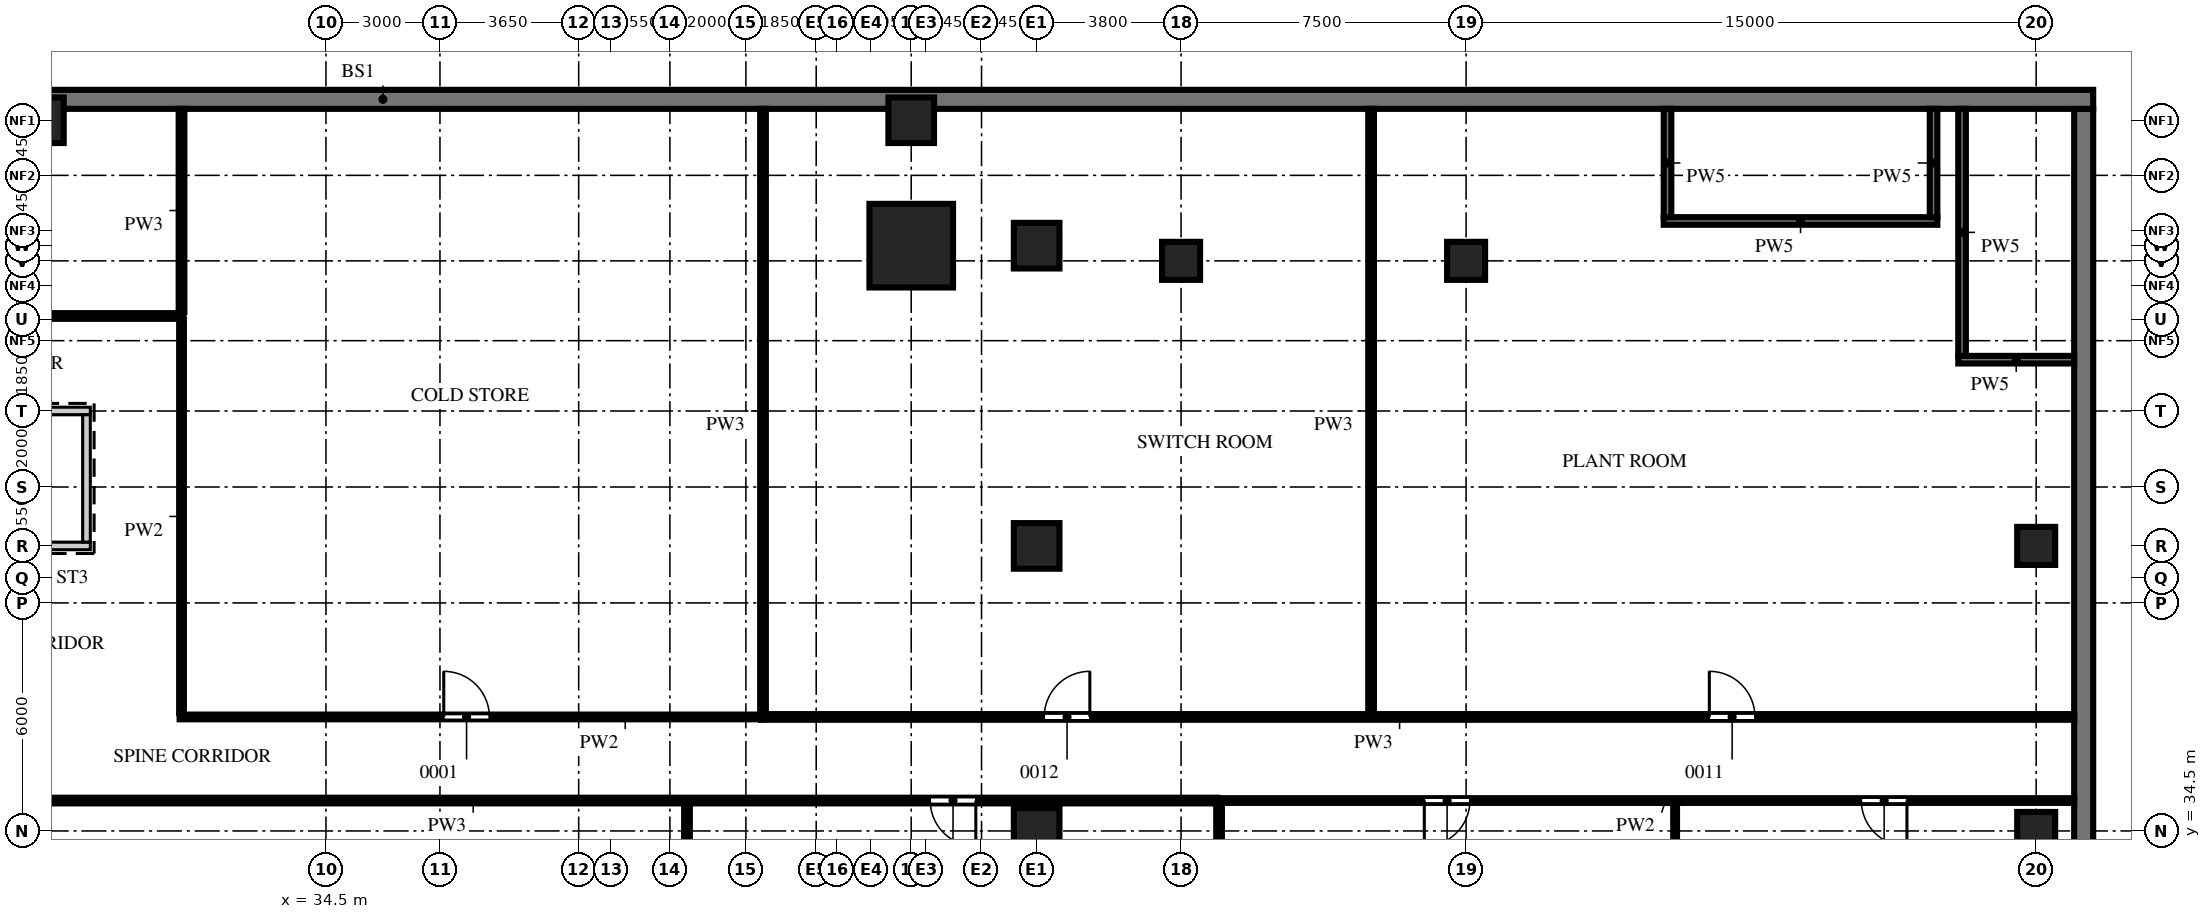
"""IFC4 building model, lengths in metres.
Left out: names, types, materials, properties, quantities, classifications, styles, units other than length and angle.
Written with IfcOpenShell. Run it as: python <this file> out.ifc"""

import sys

from ifc_helpers import new_model, si_unit, direction, frame, frame_2d, origin, origin_2d, place, context, subcontext, project, spatial, rectangle, extrude, source, transform, mapped, element, fill, save


model = new_model("IFC4")
c1 = context("Model", 3, precision=1e-05, world=origin(), true_north=direction((0.0, 1.0)))
c2 = subcontext(c1, "Body", "Model", "MODEL_VIEW")
j1 = project(units=[si_unit("LENGTHUNIT", "METRE"), si_unit("PLANEANGLEUNIT", "RADIAN")], contexts=[c1])
p1 = place(None, origin())
s1 = spatial("IfcSite", under=j1, at=p1, CompositionType="ELEMENT")
p2 = place(p1, origin())
s2 = spatial("IfcBuilding", under=s1, at=p2, CompositionType="ELEMENT")
p3 = place(p2, frame((0.0, 0.0, -9.0)))
s3 = spatial("IfcBuildingStorey", under=s2, at=p3, CompositionType="ELEMENT", Elevation=-9.0)
m1 = source(origin(), c2, "Body", "SweptSolid", [
    extrude(rectangle(XDim=7.1, YDim=0.2, at=frame_2d((3.55, 0.0))), origin(), (0.0, 0.0, 1.0), 4.2),
])
p4 = place(p3, frame((21.2, 45.55, 0.0), z_axis=(0.0, 0.0, 1.0), x_axis=(1.0, 0.0, 0.0)))
e1 = element("IfcWall", 1, at=p4, inside=s3, PredefinedType="SHEAR", context=c2, shape_type="MappedRepresentation", body=[
    mapped(m1, transform((0.0, 0.0, 0.0))),
])
m2 = source(origin(), c2, "Body", "SweptSolid", [
    extrude(rectangle(XDim=1.2, YDim=2.1, at=frame_2d((0.6, 1.05))), frame((0.0, 0.11, 0.0), z_axis=(0.0, -1.0, 0.0), x_axis=(1.0, 0.0, 0.0)), (0.0, 0.0, 1.0), 0.22),
])
p5 = place(p4, frame((0.15, 0.0, 0.0)))
e2 = element("IfcOpeningElement", 2, at=p5, cuts=e1, PredefinedType="OPENING", context=c2, shape_type="MappedRepresentation", body=[
    mapped(m2, transform((0.0, 0.0, 0.0))),
])
p6 = place(p3, frame((21.2, 42.0, 0.0), z_axis=(0.0, 0.0, 1.0), x_axis=(1.0, 0.0, 0.0)))
e3 = element("IfcWall", 3, at=p6, inside=s3, PredefinedType="SHEAR", context=c2, shape_type="MappedRepresentation", body=[
    mapped(m1, transform((0.0, 0.0, 0.0))),
])
m3 = source(origin(), c2, "Body", "SweptSolid", [
    extrude(rectangle(XDim=3.35, YDim=0.2, at=frame_2d((1.675, 0.0))), origin(), (0.0, 0.0, 1.0), 4.2),
])
p7 = place(p3, frame((28.2, 42.1, 0.0), z_axis=(0.0, 0.0, 1.0), x_axis=(0.0, 1.0, 0.0)))
e4 = element("IfcWall", 4, at=p7, inside=s3, PredefinedType="SHEAR", context=c2, shape_type="MappedRepresentation", body=[
    mapped(m3, transform((0.0, 0.0, 0.0))),
])
m4 = source(origin(), c2, "Body", "SweptSolid", [
    extrude(rectangle(XDim=53.0, YDim=0.5, at=frame_2d((26.5, 0.0))), origin(), (0.0, 0.0, 1.0), 4.2),
])
p8 = place(p3, frame((80.75, 0.5, 0.0), z_axis=(0.0, 0.0, 1.0), x_axis=(0.0, 1.0, 0.0)))
e5 = element("IfcWall", 5, at=p8, inside=s3, PredefinedType="STANDARD", context=c2, shape_type="MappedRepresentation", body=[
    mapped(m4, transform((0.0, 0.0, 0.0))),
])
m5 = source(origin(), c2, "Body", "SweptSolid", [
    extrude(rectangle(XDim=90.0, YDim=0.5, at=frame_2d((45.0, 0.0))), origin(), (0.0, 0.0, 1.0), 4.2),
])
p9 = place(p3, frame((-9.0, 53.75, 0.0), z_axis=(0.0, 0.0, 1.0), x_axis=(1.0, 0.0, 0.0)))
e6 = element("IfcWall", 6, at=p9, inside=s3, PredefinedType="STANDARD", context=c2, shape_type="MappedRepresentation", body=[
    mapped(m5, transform((0.0, 0.0, 0.0))),
])
m6 = source(origin(), c2, "Body", "SweptSolid", [
    extrude(rectangle(XDim=2.2, YDim=2.2, at=origin_2d()), origin(), (0.0, 0.0, 1.0), 4.5),
])
p10 = place(p3, frame((49.9, 49.9, 0.0), z_axis=(0.0, 0.0, 1.0), x_axis=(1.0, 0.0, 0.0)))
e7 = element("IfcColumn", 7, at=p10, inside=s3, PredefinedType="COLUMN", context=c2, shape_type="MappedRepresentation", body=[
    mapped(m6, transform((0.0, 0.0, 0.0))),
])
m7 = source(origin(), c2, "Body", "SweptSolid", [
    extrude(rectangle(XDim=1.2, YDim=1.2, at=origin_2d()), origin(), (0.0, 0.0, 1.0), 4.2),
])
for number, where, z_axis, x_axis in (
    (8, (53.2, 34.5, 0.0), (0.0, 0.0, 1.0), (1.0, 0.0, 0.0)),
    (9, (53.2, 42.0, 0.0), (0.0, 0.0, 1.0), (1.0, 0.0, 0.0)),
    (10, (53.2, 49.9, 0.0), (0.0, 0.0, 1.0), (1.0, 0.0, 0.0)),
    (11, (27.0, 53.2, 0.0), (0.0, 0.0, 1.0), (1.0, 0.0, 0.0)),
    (12, (49.9, 53.2, 0.0), (0.0, 0.0, 1.0), (1.0, 0.0, 0.0)),
):
    element("IfcColumn", number, at=place(p3, frame(where, z_axis=z_axis, x_axis=x_axis)), inside=s3, PredefinedType="COLUMN", context=c2, shape_type="MappedRepresentation", body=[
        mapped(m7, transform((0.0, 0.0, 0.0))),
    ])
m8 = source(origin(), c2, "Body", "SweptSolid", [
    extrude(rectangle(XDim=1.0, YDim=1.0, at=origin_2d()), origin(), (0.0, 0.0, 1.0), 4.2),
])
for number, where, z_axis, x_axis in (
    (13, (57.0, 49.5, 0.0), (0.0, 0.0, 1.0), (1.0, 0.0, 0.0)),
    (14, (64.5, 49.5, 0.0), (0.0, 0.0, 1.0), (1.0, 0.0, 0.0)),
    (15, (79.5, 34.5, 0.0), (0.0, 0.0, 1.0), (1.0, 0.0, 0.0)),
    (16, (79.5, 42.0, 0.0), (0.0, 0.0, 1.0), (1.0, 0.0, 0.0)),
):
    element("IfcColumn", number, at=place(p3, frame(where, z_axis=z_axis, x_axis=x_axis)), inside=s3, PredefinedType="COLUMN", context=c2, shape_type="MappedRepresentation", body=[
        mapped(m8, transform((0.0, 0.0, 0.0))),
    ])
m9 = source(origin(), c2, "Body", "SweptSolid", [
    extrude(rectangle(XDim=15.7, YDim=0.15, at=frame_2d((7.85, 0.0))), origin(), (0.0, 0.0, 1.0), 4.2),
])
for number, where, z_axis, x_axis in (
    (17, (44.0, 19.5, 0.0), (0.0, 0.0, 1.0), (0.0, 1.0, 0.0)),
    (18, (58.0, 19.5, 0.0), (0.0, 0.0, 1.0), (0.0, 1.0, 0.0)),
):
    element("IfcWall", number, at=place(p3, frame(where, z_axis=z_axis, x_axis=x_axis)), inside=s3, PredefinedType="PARTITIONING", context=c2, shape_type="MappedRepresentation", body=[
        mapped(m9, transform((0.0, 0.0, 0.0))),
    ])
m10 = source(origin(), c2, "Body", "SweptSolid", [
    extrude(rectangle(XDim=15.7, YDim=0.1, at=frame_2d((7.85, 0.0))), origin(), (0.0, 0.0, 1.0), 4.2),
])
p11 = place(p3, frame((70.0, 19.5, 0.0), z_axis=(0.0, 0.0, 1.0), x_axis=(0.0, 1.0, 0.0)))
e19 = element("IfcWall", 19, at=p11, inside=s3, PredefinedType="PARTITIONING", context=c2, shape_type="MappedRepresentation", body=[
    mapped(m10, transform((0.0, 0.0, 0.0))),
])
m11 = source(origin(), c2, "Body", "SweptSolid", [
    extrude(rectangle(XDim=31.6, YDim=0.15, at=frame_2d((15.8, 0.0))), origin(), (0.0, 0.0, 1.0), 4.2),
])
p12 = place(p3, frame((26.35, 35.3, 0.0), z_axis=(0.0, 0.0, 1.0), x_axis=(1.0, 0.0, 0.0)))
e20 = element("IfcWall", 20, at=p12, inside=s3, PredefinedType="PARTITIONING", context=c2, shape_type="MappedRepresentation", body=[
    mapped(m11, transform((0.0, 0.0, 0.0))),
])
m12 = source(origin(), c2, "Body", "SweptSolid", [
    extrude(rectangle(XDim=1.2, YDim=2.1, at=frame_2d((0.6, 1.05))), frame((0.0, 0.085, 0.0), z_axis=(0.0, -1.0, 0.0), x_axis=(1.0, 0.0, 0.0)), (0.0, 0.0, 1.0), 0.17),
])
p13 = place(p12, frame((24.05, 0.0, 0.0)))
e21 = element("IfcOpeningElement", 21, at=p13, cuts=e20, PredefinedType="OPENING", context=c2, shape_type="MappedRepresentation", body=[
    mapped(m12, transform((0.0, 0.0, 0.0))),
])
m13 = source(origin(), c2, "Body", "SweptSolid", [
    extrude(rectangle(XDim=22.55, YDim=0.125, at=frame_2d((11.275, 0.0))), origin(), (0.0, 0.0, 1.0), 4.2),
])
p14 = place(p3, frame((57.95, 35.3, 0.0), z_axis=(0.0, 0.0, 1.0), x_axis=(1.0, 0.0, 0.0)))
e22 = element("IfcWall", 22, at=p14, inside=s3, PredefinedType="PARTITIONING", context=c2, shape_type="MappedRepresentation", body=[
    mapped(m13, transform((0.0, 0.0, 0.0))),
])
m14 = source(origin(), c2, "Body", "SweptSolid", [
    extrude(rectangle(XDim=1.2, YDim=2.1, at=frame_2d((0.6, 1.05))), frame((0.0, 0.073, 0.0), z_axis=(0.0, -1.0, 0.0), x_axis=(1.0, 0.0, 0.0)), (0.0, 0.0, 1.0), 0.145),
])
p15 = place(p14, frame((5.45, 0.0, 0.0)))
e23 = element("IfcOpeningElement", 23, at=p15, cuts=e22, PredefinedType="OPENING", context=c2, shape_type="MappedRepresentation", body=[
    mapped(m14, transform((0.0, 0.0, 0.0))),
])
p16 = place(p14, frame((16.95, 0.0, 0.0)))
e24 = element("IfcOpeningElement", 24, at=p16, cuts=e22, PredefinedType="OPENING", context=c2, shape_type="MappedRepresentation", body=[
    mapped(m14, transform((0.0, 0.0, 0.0))),
])
m15 = source(origin(), c2, "Body", "SweptSolid", [
    extrude(rectangle(XDim=15.3, YDim=0.125, at=frame_2d((7.65, 0.0))), origin(), (0.0, 0.0, 1.0), 4.2),
])
p17 = place(p3, frame((30.65, 37.5, 0.0), z_axis=(0.0, 0.0, 1.0), x_axis=(1.0, 0.0, 0.0)))
e25 = element("IfcWall", 25, at=p17, inside=s3, PredefinedType="PARTITIONING", context=c2, shape_type="MappedRepresentation", body=[
    mapped(m15, transform((0.0, 0.0, 0.0))),
])
p18 = place(p17, frame((6.95, 0.0, 0.0)))
e26 = element("IfcOpeningElement", 26, at=p18, cuts=e25, PredefinedType="OPENING", context=c2, shape_type="MappedRepresentation", body=[
    mapped(m14, transform((0.0, 0.0, 0.0))),
])
m16 = source(origin(), c2, "Body", "SweptSolid", [
    extrude(rectangle(XDim=34.55, YDim=0.15, at=frame_2d((17.275, 0.0))), origin(), (0.0, 0.0, 1.0), 4.2),
])
p19 = place(p3, frame((45.95, 37.5, 0.0), z_axis=(0.0, 0.0, 1.0), x_axis=(1.0, 0.0, 0.0)))
e27 = element("IfcWall", 27, at=p19, inside=s3, PredefinedType="PARTITIONING", context=c2, shape_type="MappedRepresentation", body=[
    mapped(m16, transform((0.0, 0.0, 0.0))),
])
p20 = place(p19, frame((7.45, 0.0, 0.0)))
e28 = element("IfcOpeningElement", 28, at=p20, cuts=e27, PredefinedType="OPENING", context=c2, shape_type="MappedRepresentation", body=[
    mapped(m12, transform((0.0, 0.0, 0.0))),
])
p21 = place(p19, frame((24.95, 0.0, 0.0)))
e29 = element("IfcOpeningElement", 29, at=p21, cuts=e27, PredefinedType="OPENING", context=c2, shape_type="MappedRepresentation", body=[
    mapped(m12, transform((0.0, 0.0, 0.0))),
])
m17 = source(origin(), c2, "Body", "SweptSolid", [
    extrude(rectangle(XDim=10.35, YDim=0.125, at=frame_2d((5.175, 0.0))), origin(), (0.0, 0.0, 1.0), 4.2),
])
p22 = place(p3, frame((30.7, 37.6, 0.0), z_axis=(0.0, 0.0, 1.0), x_axis=(0.0, 1.0, 0.0)))
e30 = element("IfcWall", 30, at=p22, inside=s3, PredefinedType="PARTITIONING", context=c2, shape_type="MappedRepresentation", body=[
    mapped(m17, transform((0.0, 0.0, 0.0))),
])
m18 = source(origin(), c2, "Body", "SweptSolid", [
    extrude(rectangle(XDim=15.9, YDim=0.15, at=frame_2d((7.95, 0.0))), origin(), (0.0, 0.0, 1.0), 4.2),
])
for number, where, z_axis, x_axis in (
    (31, (46.0, 37.6, 0.0), (0.0, 0.0, 1.0), (0.0, 1.0, 0.0)),
    (32, (62.0, 37.6, 0.0), (0.0, 0.0, 1.0), (0.0, 1.0, 0.0)),
):
    element("IfcWall", number, at=place(p3, frame(where, z_axis=z_axis, x_axis=x_axis)), inside=s3, PredefinedType="PARTITIONING", context=c2, shape_type="MappedRepresentation", body=[
        mapped(m18, transform((0.0, 0.0, 0.0))),
    ])
m19 = source(origin(), c2, "Body", "SweptSolid", [
    extrude(rectangle(XDim=26.45, YDim=0.15, at=frame_2d((13.225, 0.0))), origin(), (0.0, 0.0, 1.0), 4.2),
])
p23 = place(p3, frame((4.3, 48.05, 0.0), z_axis=(0.0, 0.0, 1.0), x_axis=(1.0, 0.0, 0.0)))
e33 = element("IfcWall", 33, at=p23, inside=s3, PredefinedType="PARTITIONING", context=c2, shape_type="MappedRepresentation", body=[
    mapped(m19, transform((0.0, 0.0, 0.0))),
])
m20 = source(origin(), c2, "Body", "SweptSolid", [
    extrude(rectangle(XDim=0.9, YDim=2.1, at=frame_2d((0.45, 1.05))), frame((0.0, 0.085, 0.0), z_axis=(0.0, -1.0, 0.0), x_axis=(1.0, 0.0, 0.0)), (0.0, 0.0, 1.0), 0.17),
])
p24 = place(p23, frame((3.35, 0.0, 0.0)))
e34 = element("IfcOpeningElement", 34, at=p24, cuts=e33, PredefinedType="OPENING", context=c2, shape_type="MappedRepresentation", body=[
    mapped(m20, transform((0.0, 0.0, 0.0))),
])
p25 = place(p23, frame((16.6, 0.0, 0.0)))
e35 = element("IfcOpeningElement", 35, at=p25, cuts=e33, PredefinedType="OPENING", context=c2, shape_type="MappedRepresentation", body=[
    mapped(m20, transform((0.0, 0.0, 0.0))),
])
m21 = source(origin(), c2, "Body", "SweptSolid", [
    extrude(rectangle(XDim=5.35, YDim=0.15, at=frame_2d((2.675, 0.0))), origin(), (0.0, 0.0, 1.0), 4.2),
])
p26 = place(p3, frame((30.7, 48.15, 0.0), z_axis=(0.0, 0.0, 1.0), x_axis=(0.0, 1.0, 0.0)))
e36 = element("IfcWall", 36, at=p26, inside=s3, PredefinedType="PARTITIONING", context=c2, shape_type="MappedRepresentation", body=[
    mapped(m21, transform((0.0, 0.0, 0.0))),
])
m22 = source(origin(), c2, "Body", "SweptSolid", [
    extrude(rectangle(XDim=7.2, YDim=0.2, at=frame_2d((3.6, 0.0))), origin(), (0.0, 0.0, 1.0), 4.2),
])
p27 = place(p3, frame((69.7, 50.55, 0.0), z_axis=(0.0, 0.0, 1.0), x_axis=(1.0, 0.0, 0.0)))
e37 = element("IfcWall", 37, at=p27, inside=s3, PredefinedType="PARTITIONING", context=c2, shape_type="MappedRepresentation", body=[
    mapped(m22, transform((0.0, 0.0, 0.0))),
])
m23 = source(origin(), c2, "Body", "SweptSolid", [
    extrude(rectangle(XDim=2.85, YDim=0.2, at=frame_2d((1.425, 0.0))), origin(), (0.0, 0.0, 1.0), 4.2),
])
for number, where, z_axis, x_axis in (
    (38, (69.8, 50.65, 0.0), (0.0, 0.0, 1.0), (0.0, 1.0, 0.0)),
    (39, (76.8, 50.65, 0.0), (0.0, 0.0, 1.0), (0.0, 1.0, 0.0)),
):
    element("IfcWall", number, at=place(p3, frame(where, z_axis=z_axis, x_axis=x_axis)), inside=s3, PredefinedType="PARTITIONING", context=c2, shape_type="MappedRepresentation", body=[
        mapped(m23, transform((0.0, 0.0, 0.0))),
    ])
m24 = source(origin(), c2, "Body", "SweptSolid", [
    extrude(rectangle(XDim=3.05, YDim=0.2, at=frame_2d((1.525, 0.0))), origin(), (0.0, 0.0, 1.0), 4.2),
])
p28 = place(p3, frame((77.45, 46.9, 0.0), z_axis=(0.0, 0.0, 1.0), x_axis=(1.0, 0.0, 0.0)))
e40 = element("IfcWall", 40, at=p28, inside=s3, PredefinedType="PARTITIONING", context=c2, shape_type="MappedRepresentation", body=[
    mapped(m24, transform((0.0, 0.0, 0.0))),
])
m25 = source(origin(), c2, "Body", "SweptSolid", [
    extrude(rectangle(XDim=6.5, YDim=0.2, at=frame_2d((3.25, 0.0))), origin(), (0.0, 0.0, 1.0), 4.2),
])
p29 = place(p3, frame((77.55, 47.0, 0.0), z_axis=(0.0, 0.0, 1.0), x_axis=(0.0, 1.0, 0.0)))
e41 = element("IfcWall", 41, at=p29, inside=s3, PredefinedType="PARTITIONING", context=c2, shape_type="MappedRepresentation", body=[
    mapped(m25, transform((0.0, 0.0, 0.0))),
])
m26 = source(origin(), c2, "Body", "SweptSolid", [
    extrude(rectangle(XDim=1.2, YDim=2.1, at=frame_2d((0.6, 1.05))), frame((0.0, 0.025, 0.0), z_axis=(0.0, -1.0, 0.0), x_axis=(1.0, 0.0, 0.0)), (0.0, 0.0, 1.0), 0.05),
])
p30 = place(p13, origin())
e42 = element("IfcDoor", 42, at=p30, inside=s3, OperationType="SINGLE_SWING_RIGHT", PredefinedType="DOOR", context=c2, shape_type="MappedRepresentation", body=[
    mapped(m26, transform((0.0, 0.0, 0.0))),
])
fill(e21, e42)
p31 = place(p15, origin())
e43 = element("IfcDoor", 43, at=p31, inside=s3, OperationType="SINGLE_SWING_LEFT", PredefinedType="DOOR", context=c2, shape_type="MappedRepresentation", body=[
    mapped(m26, transform((0.0, 0.0, 0.0))),
])
fill(e23, e43)
p32 = place(p16, origin())
e44 = element("IfcDoor", 44, at=p32, inside=s3, OperationType="SINGLE_SWING_RIGHT", PredefinedType="DOOR", context=c2, shape_type="MappedRepresentation", body=[
    mapped(m26, transform((0.0, 0.0, 0.0))),
])
fill(e24, e44)
p33 = place(p18, origin())
e45 = element("IfcDoor", 45, at=p33, inside=s3, OperationType="SINGLE_SWING_RIGHT", PredefinedType="DOOR", context=c2, shape_type="MappedRepresentation", body=[
    mapped(m26, transform((0.0, 0.0, 0.0))),
])
fill(e26, e45)
p34 = place(p20, origin())
e46 = element("IfcDoor", 46, at=p34, inside=s3, OperationType="SINGLE_SWING_LEFT", PredefinedType="DOOR", context=c2, shape_type="MappedRepresentation", body=[
    mapped(m26, transform((0.0, 0.0, 0.0))),
])
fill(e28, e46)
p35 = place(p21, origin())
e47 = element("IfcDoor", 47, at=p35, inside=s3, OperationType="SINGLE_SWING_RIGHT", PredefinedType="DOOR", context=c2, shape_type="MappedRepresentation", body=[
    mapped(m26, transform((0.0, 0.0, 0.0))),
])
fill(e29, e47)
save(model, sys.argv[1])
